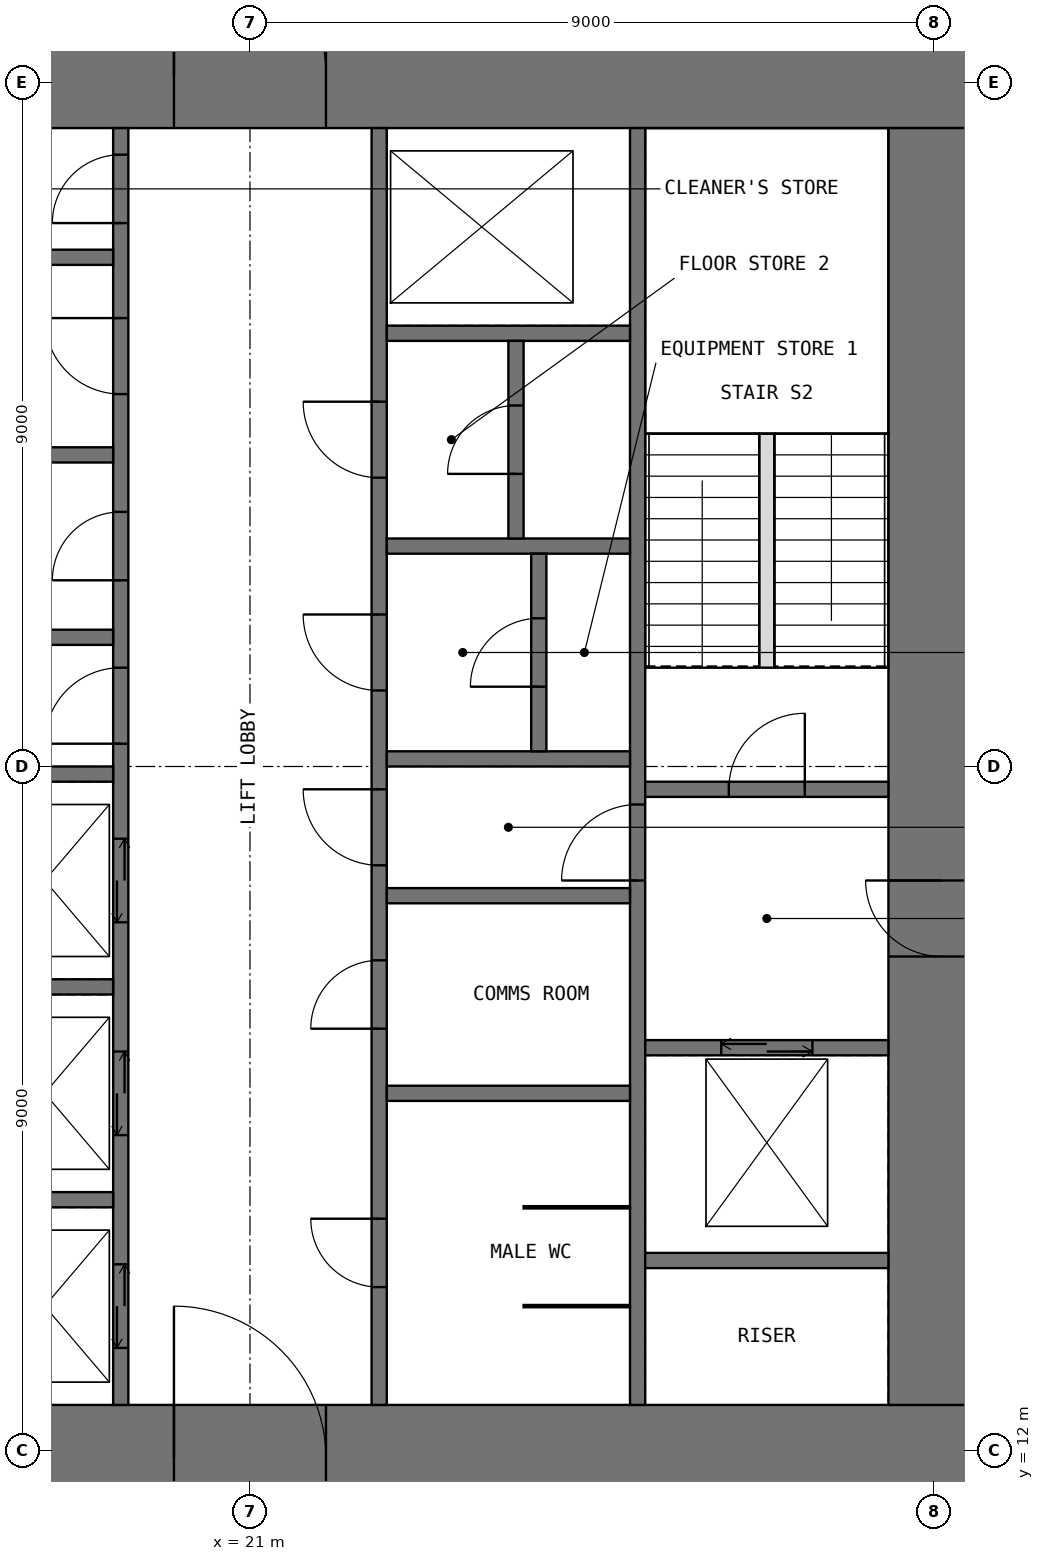
"""IFC4 building model, lengths in metres.
Left out: names, types, materials, properties, quantities, classifications, styles, units other than length and angle.
Written with IfcOpenShell. Run it as: python <this file> out.ifc"""

import sys

from ifc_helpers import new_model, si_unit, direction, frame, frame_2d, origin, place, context, subcontext, project, spatial, rectangle, extrude, element, fill, save


model = new_model("IFC4")
c1 = context("Model", 3, precision=1e-05, world=origin(), true_north=direction((0.0, 1.0)))
c2 = subcontext(c1, "Body", "Model", "MODEL_VIEW")
j1 = project(units=[si_unit("LENGTHUNIT", "METRE"), si_unit("PLANEANGLEUNIT", "RADIAN")], contexts=[c1])
p1 = place(None, origin())
s1 = spatial("IfcSite", under=j1, at=p1, CompositionType="ELEMENT")
p2 = place(p1, origin())
s2 = spatial("IfcBuilding", under=s1, at=p2, CompositionType="ELEMENT")
p3 = place(p2, frame((0.0, 0.0, 202.5)))
s3 = spatial("IfcBuildingStorey", under=s2, at=p3, CompositionType="ELEMENT", Elevation=202.5)
p4 = place(p3, frame((11.2, 11.9, -0.05), z_axis=(0.0, 0.0, 1.0), x_axis=(1.0, 0.0, 0.0)))
e1 = element("IfcWall", 1, at=p4, inside=s3, PredefinedType="SHEAR", context=c2, shape_type="SweptSolid", body=[
    extrude(rectangle(XDim=19.6, YDim=1.4, at=frame_2d((9.8, 0.0))), origin(), (0.0, 0.0, 1.0), 4.0),
])
p5 = place(p4, frame((8.8, 0.0, 0.05)))
e2 = element("IfcOpeningElement", 2, at=p5, cuts=e1, PredefinedType="OPENING", context=c2, shape_type="SweptSolid", body=[
    extrude(rectangle(XDim=2.0, YDim=2.2, at=frame_2d((1.0, 1.1))), frame((0.0, 0.71, 0.0), z_axis=(0.0, -1.0, 0.0), x_axis=(1.0, 0.0, 0.0)), (0.0, 0.0, 1.0), 1.42),
])
p6 = place(p3, frame((11.2, 30.1, -0.05), z_axis=(0.0, 0.0, 1.0), x_axis=(1.0, 0.0, 0.0)))
e3 = element("IfcWall", 3, at=p6, inside=s3, PredefinedType="SHEAR", context=c2, shape_type="SweptSolid", body=[
    extrude(rectangle(XDim=19.6, YDim=1.4, at=frame_2d((9.8, 0.0))), origin(), (0.0, 0.0, 1.0), 4.0),
])
p7 = place(p6, frame((8.8, 0.0, 0.05)))
e4 = element("IfcOpeningElement", 4, at=p7, cuts=e3, PredefinedType="OPENING", context=c2, shape_type="SweptSolid", body=[
    extrude(rectangle(XDim=2.0, YDim=2.2, at=frame_2d((1.0, 1.1))), frame((0.0, 0.71, 0.0), z_axis=(0.0, -1.0, 0.0), x_axis=(1.0, 0.0, 0.0)), (0.0, 0.0, 1.0), 1.42),
])
p8 = place(p3, frame((30.1, 12.6, -0.05), z_axis=(0.0, 0.0, 1.0), x_axis=(0.0, 1.0, 0.0)))
e5 = element("IfcWall", 5, at=p8, inside=s3, PredefinedType="SHEAR", context=c2, shape_type="SweptSolid", body=[
    extrude(rectangle(XDim=16.8, YDim=1.4, at=frame_2d((8.4, 0.0))), origin(), (0.0, 0.0, 1.0), 4.0),
])
p9 = place(p8, frame((5.9, 0.0, 0.05)))
e6 = element("IfcOpeningElement", 6, at=p9, cuts=e5, PredefinedType="OPENING", context=c2, shape_type="SweptSolid", body=[
    extrude(rectangle(XDim=1.0, YDim=2.2, at=frame_2d((0.5, 1.1))), frame((0.0, 0.71, 0.0), z_axis=(0.0, -1.0, 0.0), x_axis=(1.0, 0.0, 0.0)), (0.0, 0.0, 1.0), 1.42),
])
p10 = place(p3, frame((19.3, 12.6, -0.05), z_axis=(0.0, 0.0, 1.0), x_axis=(0.0, 1.0, 0.0)))
e7 = element("IfcWall", 7, at=p10, inside=s3, PredefinedType="SHEAR", context=c2, shape_type="SweptSolid", body=[
    extrude(rectangle(XDim=16.8, YDim=0.2, at=frame_2d((8.4, 0.0))), origin(), (0.0, 0.0, 1.0), 4.0),
])
p11 = place(p10, frame((8.7, 0.0, 0.05)))
e8 = element("IfcOpeningElement", 8, at=p11, cuts=e7, PredefinedType="OPENING", context=c2, shape_type="SweptSolid", body=[
    extrude(rectangle(XDim=1.0, YDim=2.2, at=frame_2d((0.5, 1.1))), frame((0.0, 0.11, 0.0), z_axis=(0.0, -1.0, 0.0), x_axis=(1.0, 0.0, 0.0)), (0.0, 0.0, 1.0), 0.22),
])
p12 = place(p10, frame((10.85, 0.0, 0.05)))
e9 = element("IfcOpeningElement", 9, at=p12, cuts=e7, PredefinedType="OPENING", context=c2, shape_type="SweptSolid", body=[
    extrude(rectangle(XDim=0.9, YDim=2.2, at=frame_2d((0.45, 1.1))), frame((0.0, 0.11, 0.0), z_axis=(0.0, -1.0, 0.0), x_axis=(1.0, 0.0, 0.0)), (0.0, 0.0, 1.0), 0.22),
])
p13 = place(p10, frame((13.3, 0.0, 0.05)))
e10 = element("IfcOpeningElement", 10, at=p13, cuts=e7, PredefinedType="OPENING", context=c2, shape_type="SweptSolid", body=[
    extrude(rectangle(XDim=1.0, YDim=2.2, at=frame_2d((0.5, 1.1))), frame((0.0, 0.11, 0.0), z_axis=(0.0, -1.0, 0.0), x_axis=(1.0, 0.0, 0.0)), (0.0, 0.0, 1.0), 0.22),
])
p14 = place(p10, frame((15.55, 0.0, 0.05)))
e11 = element("IfcOpeningElement", 11, at=p14, cuts=e7, PredefinedType="OPENING", context=c2, shape_type="SweptSolid", body=[
    extrude(rectangle(XDim=0.9, YDim=2.2, at=frame_2d((0.45, 1.1))), frame((0.0, 0.11, 0.0), z_axis=(0.0, -1.0, 0.0), x_axis=(1.0, 0.0, 0.0)), (0.0, 0.0, 1.0), 0.22),
])
p15 = place(p10, frame((0.75, 0.0, 0.05)))
e12 = element("IfcOpeningElement", 12, at=p15, cuts=e7, PredefinedType="OPENING", context=c2, shape_type="SweptSolid", body=[
    extrude(rectangle(XDim=1.1, YDim=2.2, at=frame_2d((0.55, 1.1))), frame((0.0, 0.11, 0.0), z_axis=(0.0, -1.0, 0.0), x_axis=(1.0, 0.0, 0.0)), (0.0, 0.0, 1.0), 0.22),
])
p16 = place(p10, frame((3.55, 0.0, 0.05)))
e13 = element("IfcOpeningElement", 13, at=p16, cuts=e7, PredefinedType="OPENING", context=c2, shape_type="SweptSolid", body=[
    extrude(rectangle(XDim=1.1, YDim=2.2, at=frame_2d((0.55, 1.1))), frame((0.0, 0.11, 0.0), z_axis=(0.0, -1.0, 0.0), x_axis=(1.0, 0.0, 0.0)), (0.0, 0.0, 1.0), 0.22),
])
p17 = place(p10, frame((6.35, 0.0, 0.05)))
e14 = element("IfcOpeningElement", 14, at=p17, cuts=e7, PredefinedType="OPENING", context=c2, shape_type="SweptSolid", body=[
    extrude(rectangle(XDim=1.1, YDim=2.2, at=frame_2d((0.55, 1.1))), frame((0.0, 0.11, 0.0), z_axis=(0.0, -1.0, 0.0), x_axis=(1.0, 0.0, 0.0)), (0.0, 0.0, 1.0), 0.22),
])
p18 = place(p3, frame((22.7, 12.6, -0.05), z_axis=(0.0, 0.0, 1.0), x_axis=(0.0, 1.0, 0.0)))
e15 = element("IfcWall", 15, at=p18, inside=s3, PredefinedType="SHEAR", context=c2, shape_type="SweptSolid", body=[
    extrude(rectangle(XDim=16.8, YDim=0.2, at=frame_2d((8.4, 0.0))), origin(), (0.0, 0.0, 1.0), 4.0),
])
p19 = place(p18, frame((7.1, 0.0, 0.05)))
e16 = element("IfcOpeningElement", 16, at=p19, cuts=e15, PredefinedType="OPENING", context=c2, shape_type="SweptSolid", body=[
    extrude(rectangle(XDim=1.0, YDim=2.2, at=frame_2d((0.5, 1.1))), frame((0.0, 0.11, 0.0), z_axis=(0.0, -1.0, 0.0), x_axis=(1.0, 0.0, 0.0)), (0.0, 0.0, 1.0), 0.22),
])
p20 = place(p18, frame((1.55, 0.0, 0.05)))
e17 = element("IfcOpeningElement", 17, at=p20, cuts=e15, PredefinedType="OPENING", context=c2, shape_type="SweptSolid", body=[
    extrude(rectangle(XDim=0.9, YDim=2.2, at=frame_2d((0.45, 1.1))), frame((0.0, 0.11, 0.0), z_axis=(0.0, -1.0, 0.0), x_axis=(1.0, 0.0, 0.0)), (0.0, 0.0, 1.0), 0.22),
])
p21 = place(p18, frame((4.95, 0.0, 0.05)))
e18 = element("IfcOpeningElement", 18, at=p21, cuts=e15, PredefinedType="OPENING", context=c2, shape_type="SweptSolid", body=[
    extrude(rectangle(XDim=0.9, YDim=2.2, at=frame_2d((0.45, 1.1))), frame((0.0, 0.11, 0.0), z_axis=(0.0, -1.0, 0.0), x_axis=(1.0, 0.0, 0.0)), (0.0, 0.0, 1.0), 0.22),
])
p22 = place(p18, frame((9.4, 0.0, 0.05)))
e19 = element("IfcOpeningElement", 19, at=p22, cuts=e15, PredefinedType="OPENING", context=c2, shape_type="SweptSolid", body=[
    extrude(rectangle(XDim=1.0, YDim=2.2, at=frame_2d((0.5, 1.1))), frame((0.0, 0.11, 0.0), z_axis=(0.0, -1.0, 0.0), x_axis=(1.0, 0.0, 0.0)), (0.0, 0.0, 1.0), 0.22),
])
p23 = place(p18, frame((12.2, 0.0, 0.05)))
e20 = element("IfcOpeningElement", 20, at=p23, cuts=e15, PredefinedType="OPENING", context=c2, shape_type="SweptSolid", body=[
    extrude(rectangle(XDim=1.0, YDim=2.2, at=frame_2d((0.5, 1.1))), frame((0.0, 0.11, 0.0), z_axis=(0.0, -1.0, 0.0), x_axis=(1.0, 0.0, 0.0)), (0.0, 0.0, 1.0), 0.22),
])
p24 = place(p3, frame((26.1, 12.6, -0.05), z_axis=(0.0, 0.0, 1.0), x_axis=(0.0, 1.0, 0.0)))
e21 = element("IfcWall", 21, at=p24, inside=s3, PredefinedType="SHEAR", context=c2, shape_type="SweptSolid", body=[
    extrude(rectangle(XDim=16.8, YDim=0.2, at=frame_2d((8.4, 0.0))), origin(), (0.0, 0.0, 1.0), 4.0),
])
p25 = place(p24, frame((6.9, 0.0, 0.05)))
e22 = element("IfcOpeningElement", 22, at=p25, cuts=e21, PredefinedType="OPENING", context=c2, shape_type="SweptSolid", body=[
    extrude(rectangle(XDim=1.0, YDim=2.2, at=frame_2d((0.5, 1.1))), frame((0.0, 0.11, 0.0), z_axis=(0.0, -1.0, 0.0), x_axis=(1.0, 0.0, 0.0)), (0.0, 0.0, 1.0), 0.22),
])
for number, where, z_axis, x_axis in (
    (23, (16.0, 15.3, -0.05), (0.0, 0.0, 1.0), (1.0, 0.0, 0.0)),
    (24, (16.0, 18.1, -0.05), (0.0, 0.0, 1.0), (1.0, 0.0, 0.0)),
    (25, (16.0, 20.9, -0.05), (0.0, 0.0, 1.0), (1.0, 0.0, 0.0)),
    (26, (16.0, 22.7, -0.05), (0.0, 0.0, 1.0), (1.0, 0.0, 0.0)),
    (27, (16.0, 25.1, -0.05), (0.0, 0.0, 1.0), (1.0, 0.0, 0.0)),
    (28, (16.0, 27.7, -0.05), (0.0, 0.0, 1.0), (1.0, 0.0, 0.0)),
    (29, (22.8, 16.7, -0.05), (0.0, 0.0, 1.0), (1.0, 0.0, 0.0)),
    (30, (22.8, 19.3, -0.05), (0.0, 0.0, 1.0), (1.0, 0.0, 0.0)),
    (31, (22.8, 21.1, -0.05), (0.0, 0.0, 1.0), (1.0, 0.0, 0.0)),
    (32, (22.8, 23.9, -0.05), (0.0, 0.0, 1.0), (1.0, 0.0, 0.0)),
    (33, (22.8, 26.7, -0.05), (0.0, 0.0, 1.0), (1.0, 0.0, 0.0)),
    (34, (26.2, 14.5, -0.05), (0.0, 0.0, 1.0), (1.0, 0.0, 0.0)),
):
    element("IfcWall", number, at=place(p3, frame(where, z_axis=z_axis, x_axis=x_axis)), inside=s3, PredefinedType="SHEAR", context=c2, shape_type="SweptSolid", body=[
        extrude(rectangle(XDim=3.2, YDim=0.2, at=frame_2d((1.6, 0.0))), origin(), (0.0, 0.0, 1.0), 4.0),
    ])
p26 = place(p3, frame((26.2, 17.3, -0.05), z_axis=(0.0, 0.0, 1.0), x_axis=(1.0, 0.0, 0.0)))
e35 = element("IfcWall", 35, at=p26, inside=s3, PredefinedType="SHEAR", context=c2, shape_type="SweptSolid", body=[
    extrude(rectangle(XDim=3.2, YDim=0.2, at=frame_2d((1.6, 0.0))), origin(), (0.0, 0.0, 1.0), 4.0),
])
p27 = place(p26, frame((1.0, 0.0, 0.05)))
e36 = element("IfcOpeningElement", 36, at=p27, cuts=e35, PredefinedType="OPENING", context=c2, shape_type="SweptSolid", body=[
    extrude(rectangle(XDim=1.2, YDim=2.2, at=frame_2d((0.6, 1.1))), frame((0.0, 0.11, 0.0), z_axis=(0.0, -1.0, 0.0), x_axis=(1.0, 0.0, 0.0)), (0.0, 0.0, 1.0), 0.22),
])
p28 = place(p3, frame((26.2, 20.7, -0.05), z_axis=(0.0, 0.0, 1.0), x_axis=(1.0, 0.0, 0.0)))
e37 = element("IfcWall", 37, at=p28, inside=s3, PredefinedType="SHEAR", context=c2, shape_type="SweptSolid", body=[
    extrude(rectangle(XDim=3.2, YDim=0.2, at=frame_2d((1.6, 0.0))), origin(), (0.0, 0.0, 1.0), 4.0),
])
p29 = place(p28, frame((1.1, 0.0, 0.05)))
e38 = element("IfcOpeningElement", 38, at=p29, cuts=e37, PredefinedType="OPENING", context=c2, shape_type="SweptSolid", body=[
    extrude(rectangle(XDim=1.0, YDim=2.2, at=frame_2d((0.5, 1.1))), frame((0.0, 0.11, 0.0), z_axis=(0.0, -1.0, 0.0), x_axis=(1.0, 0.0, 0.0)), (0.0, 0.0, 1.0), 0.22),
])
for number, where, z_axis, x_axis in (
    (39, (24.6, 13.9, 0.0), (0.0, 0.0, 1.0), (1.0, 0.0, 0.0)),
    (40, (24.6, 15.2, 0.0), (0.0, 0.0, 1.0), (1.0, 0.0, 0.0)),
):
    element("IfcWall", number, at=place(p3, frame(where, z_axis=z_axis, x_axis=x_axis)), inside=s3, PredefinedType="PARTITIONING", context=c2, shape_type="SweptSolid", body=[
        extrude(rectangle(XDim=1.4, YDim=0.03, at=frame_2d((0.7, 0.0))), origin(), (0.0, 0.0, 1.0), 3.75),
    ])
p30 = place(p3, frame((24.8, 21.2, -0.05), z_axis=(0.0, 0.0, 1.0), x_axis=(0.0, 1.0, 0.0)))
e41 = element("IfcWall", 41, at=p30, inside=s3, PredefinedType="SHEAR", context=c2, shape_type="SweptSolid", body=[
    extrude(rectangle(XDim=2.6, YDim=0.2, at=frame_2d((1.3, 0.0))), origin(), (0.0, 0.0, 1.0), 4.0),
])
p31 = place(p30, frame((0.85, 0.0, 0.05)))
e42 = element("IfcOpeningElement", 42, at=p31, cuts=e41, PredefinedType="OPENING", context=c2, shape_type="SweptSolid", body=[
    extrude(rectangle(XDim=0.9, YDim=2.2, at=frame_2d((0.45, 1.1))), frame((0.0, 0.11, 0.0), z_axis=(0.0, -1.0, 0.0), x_axis=(1.0, 0.0, 0.0)), (0.0, 0.0, 1.0), 0.22),
])
p32 = place(p3, frame((24.5, 24.0, -0.05), z_axis=(0.0, 0.0, 1.0), x_axis=(0.0, 1.0, 0.0)))
e43 = element("IfcWall", 43, at=p32, inside=s3, PredefinedType="SHEAR", context=c2, shape_type="SweptSolid", body=[
    extrude(rectangle(XDim=2.6, YDim=0.2, at=frame_2d((1.3, 0.0))), origin(), (0.0, 0.0, 1.0), 4.0),
])
p33 = place(p32, frame((0.85, 0.0, 0.05)))
e44 = element("IfcOpeningElement", 44, at=p33, cuts=e43, PredefinedType="OPENING", context=c2, shape_type="SweptSolid", body=[
    extrude(rectangle(XDim=0.9, YDim=2.2, at=frame_2d((0.45, 1.1))), frame((0.0, 0.11, 0.0), z_axis=(0.0, -1.0, 0.0), x_axis=(1.0, 0.0, 0.0)), (0.0, 0.0, 1.0), 0.22),
])
p34 = place(p3, frame((27.8, 22.3, 0.0), z_axis=(0.0, 0.0, 1.0), x_axis=(0.0, 1.0, 0.0)))
e45 = element("IfcWall", 45, at=p34, inside=s3, PredefinedType="PARTITIONING", context=c2, shape_type="SweptSolid", body=[
    extrude(rectangle(XDim=3.08, YDim=0.2, at=frame_2d((1.54, 0.0))), origin(), (0.0, 0.0, 1.0), 4.0),
])
p35 = place(p5, origin())
e46 = element("IfcDoor", 46, at=p35, inside=s3, OperationType="DOUBLE_DOOR_SINGLE_SWING", PredefinedType="DOOR", context=c2, shape_type="SweptSolid", body=[
    extrude(rectangle(XDim=2.0, YDim=2.2, at=frame_2d((1.0, 1.1))), frame((0.0, 0.025, 0.0), z_axis=(0.0, -1.0, 0.0), x_axis=(1.0, 0.0, 0.0)), (0.0, 0.0, 1.0), 0.05),
])
fill(e2, e46)
p36 = place(p7, origin())
e47 = element("IfcDoor", 47, at=p36, inside=s3, OperationType="DOUBLE_DOOR_SINGLE_SWING", PredefinedType="DOOR", context=c2, shape_type="SweptSolid", body=[
    extrude(rectangle(XDim=2.0, YDim=2.2, at=frame_2d((1.0, 1.1))), frame((0.0, 0.025, 0.0), z_axis=(0.0, -1.0, 0.0), x_axis=(1.0, 0.0, 0.0)), (0.0, 0.0, 1.0), 0.05),
])
fill(e4, e47)
p37 = place(p9, origin())
e48 = element("IfcDoor", 48, at=p37, inside=s3, OperationType="SINGLE_SWING_RIGHT", PredefinedType="DOOR", context=c2, shape_type="SweptSolid", body=[
    extrude(rectangle(XDim=1.0, YDim=2.2, at=frame_2d((0.5, 1.1))), frame((0.0, 0.025, 0.0), z_axis=(0.0, -1.0, 0.0), x_axis=(1.0, 0.0, 0.0)), (0.0, 0.0, 1.0), 0.05),
])
fill(e6, e48)
p38 = place(p29, origin())
e49 = element("IfcDoor", 49, at=p38, inside=s3, OperationType="SINGLE_SWING_RIGHT", PredefinedType="DOOR", context=c2, shape_type="SweptSolid", body=[
    extrude(rectangle(XDim=1.0, YDim=2.2, at=frame_2d((0.5, 1.1))), frame((0.0, 0.025, 0.0), z_axis=(0.0, -1.0, 0.0), x_axis=(1.0, 0.0, 0.0)), (0.0, 0.0, 1.0), 0.05),
])
fill(e38, e49)
p39 = place(p25, origin())
e50 = element("IfcDoor", 50, at=p39, inside=s3, OperationType="SINGLE_SWING_LEFT", PredefinedType="DOOR", context=c2, shape_type="SweptSolid", body=[
    extrude(rectangle(XDim=1.0, YDim=2.2, at=frame_2d((0.5, 1.1))), frame((0.0, 0.025, 0.0), z_axis=(0.0, -1.0, 0.0), x_axis=(1.0, 0.0, 0.0)), (0.0, 0.0, 1.0), 0.05),
])
fill(e22, e50)
p40 = place(p11, origin())
e51 = element("IfcDoor", 51, at=p40, inside=s3, OperationType="SINGLE_SWING_LEFT", PredefinedType="DOOR", context=c2, shape_type="SweptSolid", body=[
    extrude(rectangle(XDim=1.0, YDim=2.2, at=frame_2d((0.5, 1.1))), frame((0.0, 0.025, 0.0), z_axis=(0.0, -1.0, 0.0), x_axis=(1.0, 0.0, 0.0)), (0.0, 0.0, 1.0), 0.05),
])
fill(e8, e51)
p41 = place(p19, origin())
e52 = element("IfcDoor", 52, at=p41, inside=s3, OperationType="SINGLE_SWING_RIGHT", PredefinedType="DOOR", context=c2, shape_type="SweptSolid", body=[
    extrude(rectangle(XDim=1.0, YDim=2.2, at=frame_2d((0.5, 1.1))), frame((0.0, 0.025, 0.0), z_axis=(0.0, -1.0, 0.0), x_axis=(1.0, 0.0, 0.0)), (0.0, 0.0, 1.0), 0.05),
])
fill(e16, e52)
p42 = place(p12, origin())
e53 = element("IfcDoor", 53, at=p42, inside=s3, OperationType="SINGLE_SWING_LEFT", PredefinedType="DOOR", context=c2, shape_type="SweptSolid", body=[
    extrude(rectangle(XDim=0.9, YDim=2.2, at=frame_2d((0.45, 1.1))), frame((0.0, 0.025, 0.0), z_axis=(0.0, -1.0, 0.0), x_axis=(1.0, 0.0, 0.0)), (0.0, 0.0, 1.0), 0.05),
])
fill(e9, e53)
p43 = place(p13, origin())
e54 = element("IfcDoor", 54, at=p43, inside=s3, OperationType="SINGLE_SWING_RIGHT", PredefinedType="DOOR", context=c2, shape_type="SweptSolid", body=[
    extrude(rectangle(XDim=1.0, YDim=2.2, at=frame_2d((0.5, 1.1))), frame((0.0, 0.025, 0.0), z_axis=(0.0, -1.0, 0.0), x_axis=(1.0, 0.0, 0.0)), (0.0, 0.0, 1.0), 0.05),
])
fill(e10, e54)
p44 = place(p14, origin())
e55 = element("IfcDoor", 55, at=p44, inside=s3, OperationType="SINGLE_SWING_LEFT", PredefinedType="DOOR", context=c2, shape_type="SweptSolid", body=[
    extrude(rectangle(XDim=0.9, YDim=2.2, at=frame_2d((0.45, 1.1))), frame((0.0, 0.025, 0.0), z_axis=(0.0, -1.0, 0.0), x_axis=(1.0, 0.0, 0.0)), (0.0, 0.0, 1.0), 0.05),
])
fill(e11, e55)
p45 = place(p20, origin())
e56 = element("IfcDoor", 56, at=p45, inside=s3, OperationType="SINGLE_SWING_RIGHT", PredefinedType="DOOR", context=c2, shape_type="SweptSolid", body=[
    extrude(rectangle(XDim=0.9, YDim=2.2, at=frame_2d((0.45, 1.1))), frame((0.0, 0.025, 0.0), z_axis=(0.0, -1.0, 0.0), x_axis=(1.0, 0.0, 0.0)), (0.0, 0.0, 1.0), 0.05),
])
fill(e17, e56)
p46 = place(p21, origin())
e57 = element("IfcDoor", 57, at=p46, inside=s3, OperationType="SINGLE_SWING_LEFT", PredefinedType="DOOR", context=c2, shape_type="SweptSolid", body=[
    extrude(rectangle(XDim=0.9, YDim=2.2, at=frame_2d((0.45, 1.1))), frame((0.0, 0.025, 0.0), z_axis=(0.0, -1.0, 0.0), x_axis=(1.0, 0.0, 0.0)), (0.0, 0.0, 1.0), 0.05),
])
fill(e18, e57)
p47 = place(p22, origin())
e58 = element("IfcDoor", 58, at=p47, inside=s3, OperationType="SINGLE_SWING_RIGHT", PredefinedType="DOOR", context=c2, shape_type="SweptSolid", body=[
    extrude(rectangle(XDim=1.0, YDim=2.2, at=frame_2d((0.5, 1.1))), frame((0.0, 0.025, 0.0), z_axis=(0.0, -1.0, 0.0), x_axis=(1.0, 0.0, 0.0)), (0.0, 0.0, 1.0), 0.05),
])
fill(e19, e58)
p48 = place(p31, origin())
e59 = element("IfcDoor", 59, at=p48, inside=s3, OperationType="SINGLE_SWING_LEFT", PredefinedType="DOOR", context=c2, shape_type="SweptSolid", body=[
    extrude(rectangle(XDim=0.9, YDim=2.2, at=frame_2d((0.45, 1.1))), frame((0.0, 0.025, 0.0), z_axis=(0.0, -1.0, 0.0), x_axis=(1.0, 0.0, 0.0)), (0.0, 0.0, 1.0), 0.05),
])
fill(e42, e59)
p49 = place(p23, origin())
e60 = element("IfcDoor", 60, at=p49, inside=s3, OperationType="SINGLE_SWING_RIGHT", PredefinedType="DOOR", context=c2, shape_type="SweptSolid", body=[
    extrude(rectangle(XDim=1.0, YDim=2.2, at=frame_2d((0.5, 1.1))), frame((0.0, 0.025, 0.0), z_axis=(0.0, -1.0, 0.0), x_axis=(1.0, 0.0, 0.0)), (0.0, 0.0, 1.0), 0.05),
])
fill(e20, e60)
p50 = place(p33, origin())
e61 = element("IfcDoor", 61, at=p50, inside=s3, OperationType="SINGLE_SWING_LEFT", PredefinedType="DOOR", context=c2, shape_type="SweptSolid", body=[
    extrude(rectangle(XDim=0.9, YDim=2.2, at=frame_2d((0.45, 1.1))), frame((0.0, 0.025, 0.0), z_axis=(0.0, -1.0, 0.0), x_axis=(1.0, 0.0, 0.0)), (0.0, 0.0, 1.0), 0.05),
])
fill(e44, e61)
p51 = place(p15, origin())
e62 = element("IfcDoor", 62, at=p51, inside=s3, OperationType="DOUBLE_DOOR_SLIDING", PredefinedType="DOOR", context=c2, shape_type="SweptSolid", body=[
    extrude(rectangle(XDim=1.1, YDim=2.2, at=frame_2d((0.55, 1.1))), frame((0.0, 0.025, 0.0), z_axis=(0.0, -1.0, 0.0), x_axis=(1.0, 0.0, 0.0)), (0.0, 0.0, 1.0), 0.05),
])
fill(e12, e62)
p52 = place(p16, origin())
e63 = element("IfcDoor", 63, at=p52, inside=s3, OperationType="DOUBLE_DOOR_SLIDING", PredefinedType="DOOR", context=c2, shape_type="SweptSolid", body=[
    extrude(rectangle(XDim=1.1, YDim=2.2, at=frame_2d((0.55, 1.1))), frame((0.0, 0.025, 0.0), z_axis=(0.0, -1.0, 0.0), x_axis=(1.0, 0.0, 0.0)), (0.0, 0.0, 1.0), 0.05),
])
fill(e13, e63)
p53 = place(p17, origin())
e64 = element("IfcDoor", 64, at=p53, inside=s3, OperationType="DOUBLE_DOOR_SLIDING", PredefinedType="DOOR", context=c2, shape_type="SweptSolid", body=[
    extrude(rectangle(XDim=1.1, YDim=2.2, at=frame_2d((0.55, 1.1))), frame((0.0, 0.025, 0.0), z_axis=(0.0, -1.0, 0.0), x_axis=(1.0, 0.0, 0.0)), (0.0, 0.0, 1.0), 0.05),
])
fill(e14, e64)
p54 = place(p27, origin())
e65 = element("IfcDoor", 65, at=p54, inside=s3, OperationType="DOUBLE_DOOR_SLIDING", PredefinedType="DOOR", context=c2, shape_type="SweptSolid", body=[
    extrude(rectangle(XDim=1.2, YDim=2.2, at=frame_2d((0.6, 1.1))), frame((0.0, 0.025, 0.0), z_axis=(0.0, -1.0, 0.0), x_axis=(1.0, 0.0, 0.0)), (0.0, 0.0, 1.0), 0.05),
])
fill(e36, e65)
save(model, sys.argv[1])
